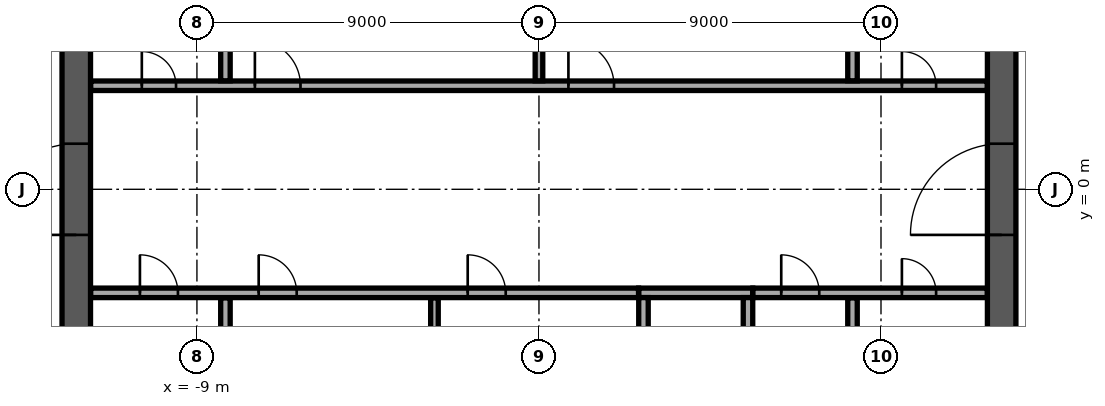
"""IFC4 building model, lengths in metres.
Left out: names, types, materials, properties, quantities, classifications, styles, units other than length and angle.
Written with IfcOpenShell. Run it as: python <this file> out.ifc"""

import sys

from ifc_helpers import new_model, si_unit, direction, frame, frame_2d, origin, place, context, subcontext, project, spatial, rectangle, extrude, element, fill, save


model = new_model("IFC4")
c1 = context("Model", 3, precision=1e-05, world=origin(), true_north=direction((0.0, 1.0)))
c2 = subcontext(c1, "Body", "Model", "MODEL_VIEW")
j1 = project(units=[si_unit("LENGTHUNIT", "METRE"), si_unit("PLANEANGLEUNIT", "RADIAN")], contexts=[c1])
p1 = place(None, origin())
s1 = spatial("IfcSite", under=j1, at=p1, CompositionType="ELEMENT")
p2 = place(p1, origin())
s2 = spatial("IfcBuilding", under=s1, at=p2, CompositionType="ELEMENT")
p3 = place(p2, frame((0.0, 0.0, 254.9)))
s3 = spatial("IfcBuildingStorey", under=s2, at=p3, CompositionType="ELEMENT", Elevation=254.9)
p4 = place(p3, frame((12.175, -11.8, 0.0), z_axis=(0.0, 0.0, 1.0), x_axis=(0.0, 1.0, 0.0)))
e1 = element("IfcWall", 1, at=p4, inside=s3, PredefinedType="SHEAR", context=c2, shape_type="SweptSolid", body=[
    extrude(rectangle(XDim=23.6, YDim=0.75, at=frame_2d((11.8, 0.0))), origin(), (0.0, 0.0, 1.0), 3.64),
])
p5 = place(p4, frame((10.6, 0.0, 0.0)))
e2 = element("IfcOpeningElement", 2, at=p5, cuts=e1, PredefinedType="OPENING", context=c2, shape_type="SweptSolid", body=[
    extrude(rectangle(XDim=2.4, YDim=2.4, at=frame_2d((1.2, 1.2))), frame((0.0, 0.385, 0.0), z_axis=(0.0, -1.0, 0.0), x_axis=(1.0, 0.0, 0.0)), (0.0, 0.0, 1.0), 0.77),
])
p6 = place(p3, frame((-12.175, -11.8, 0.0), z_axis=(0.0, 0.0, 1.0), x_axis=(0.0, 1.0, 0.0)))
e3 = element("IfcWall", 3, at=p6, inside=s3, PredefinedType="SHEAR", context=c2, shape_type="SweptSolid", body=[
    extrude(rectangle(XDim=23.6, YDim=0.75, at=frame_2d((11.8, 0.0))), origin(), (0.0, 0.0, 1.0), 3.64),
])
p7 = place(p6, frame((10.6, 0.0, 0.0)))
e4 = element("IfcOpeningElement", 4, at=p7, cuts=e3, PredefinedType="OPENING", context=c2, shape_type="SweptSolid", body=[
    extrude(rectangle(XDim=2.4, YDim=2.4, at=frame_2d((1.2, 1.2))), frame((0.0, 0.385, 0.0), z_axis=(0.0, -1.0, 0.0), x_axis=(1.0, 0.0, 0.0)), (0.0, 0.0, 1.0), 0.77),
])
p8 = place(p3, frame((2.625, -2.725, 0.0), z_axis=(0.0, 0.0, 1.0), x_axis=(1.0, 0.0, 0.0)))
e5 = element("IfcWall", 5, at=p8, inside=s3, PredefinedType="SOLIDWALL", context=c2, shape_type="SweptSolid", body=[
    extrude(rectangle(XDim=3.0, YDim=0.25, at=frame_2d((1.5, 0.0))), origin(), (0.0, 0.0, 1.0), 3.64),
])
for number, where, z_axis, x_axis in (
    (6, (2.75, -5.55, 0.0), (0.0, 0.0, 1.0), (0.0, 1.0, 0.0)),
    (7, (5.5, -5.55, 0.0), (0.0, 0.0, 1.0), (0.0, 1.0, 0.0)),
):
    element("IfcWall", number, at=place(p3, frame(where, z_axis=z_axis, x_axis=x_axis)), inside=s3, PredefinedType="SOLIDWALL", context=c2, shape_type="SweptSolid", body=[
        extrude(rectangle(XDim=2.7, YDim=0.25, at=frame_2d((1.35, 0.0))), origin(), (0.0, 0.0, 1.0), 3.64),
    ])
p9 = place(p3, frame((-8.25, -5.545, 0.0), z_axis=(0.0, 0.0, 1.0), x_axis=(0.0, 1.0, 0.0)))
e8 = element("IfcWall", 8, at=p9, inside=s3, PredefinedType="PARTITIONING", context=c2, shape_type="SweptSolid", body=[
    extrude(rectangle(XDim=2.69, YDim=0.25, at=frame_2d((1.345, 0.0))), origin(), (0.0, 0.0, 1.0), 3.64),
])
p10 = place(p3, frame((-2.75, -5.545, 0.0), z_axis=(0.0, 0.0, 1.0), x_axis=(0.0, 1.0, 0.0)))
e9 = element("IfcWall", 9, at=p10, inside=s3, PredefinedType="PARTITIONING", context=c2, shape_type="SweptSolid", body=[
    extrude(rectangle(XDim=2.69, YDim=0.2, at=frame_2d((1.345, 0.0))), origin(), (0.0, 0.0, 1.0), 3.64),
])
p11 = place(p3, frame((8.25, -5.545, 0.0), z_axis=(0.0, 0.0, 1.0), x_axis=(0.0, 1.0, 0.0)))
e10 = element("IfcWall", 10, at=p11, inside=s3, PredefinedType="PARTITIONING", context=c2, shape_type="SweptSolid", body=[
    extrude(rectangle(XDim=2.69, YDim=0.25, at=frame_2d((1.345, 0.0))), origin(), (0.0, 0.0, 1.0), 3.64),
])
p12 = place(p3, frame((-11.795, -2.725, 0.0), z_axis=(0.0, 0.0, 1.0), x_axis=(1.0, 0.0, 0.0)))
e11 = element("IfcWall", 11, at=p12, inside=s3, PredefinedType="PARTITIONING", context=c2, shape_type="SweptSolid", body=[
    extrude(rectangle(XDim=14.415, YDim=0.25, at=frame_2d((7.208, 0.0))), origin(), (0.0, 0.0, 1.0), 3.64),
])
p13 = place(p12, frame((1.295, 0.0, 0.0)))
e12 = element("IfcOpeningElement", 12, at=p13, cuts=e11, PredefinedType="OPENING", context=c2, shape_type="SweptSolid", body=[
    extrude(rectangle(XDim=1.0, YDim=2.1, at=frame_2d((0.5, 1.05))), frame((0.0, 0.135, 0.0), z_axis=(0.0, -1.0, 0.0), x_axis=(1.0, 0.0, 0.0)), (0.0, 0.0, 1.0), 0.27),
])
p14 = place(p12, frame((4.42, 0.0, 0.0)))
e13 = element("IfcOpeningElement", 13, at=p14, cuts=e11, PredefinedType="OPENING", context=c2, shape_type="SweptSolid", body=[
    extrude(rectangle(XDim=1.0, YDim=2.1, at=frame_2d((0.5, 1.05))), frame((0.0, 0.135, 0.0), z_axis=(0.0, -1.0, 0.0), x_axis=(1.0, 0.0, 0.0)), (0.0, 0.0, 1.0), 0.27),
])
p15 = place(p12, frame((9.92, 0.0, 0.0)))
e14 = element("IfcOpeningElement", 14, at=p15, cuts=e11, PredefinedType="OPENING", context=c2, shape_type="SweptSolid", body=[
    extrude(rectangle(XDim=1.0, YDim=2.1, at=frame_2d((0.5, 1.05))), frame((0.0, 0.135, 0.0), z_axis=(0.0, -1.0, 0.0), x_axis=(1.0, 0.0, 0.0)), (0.0, 0.0, 1.0), 0.27),
])
p16 = place(p3, frame((5.63, -2.725, 0.0), z_axis=(0.0, 0.0, 1.0), x_axis=(1.0, 0.0, 0.0)))
e15 = element("IfcWall", 15, at=p16, inside=s3, PredefinedType="PARTITIONING", context=c2, shape_type="SweptSolid", body=[
    extrude(rectangle(XDim=6.165, YDim=0.25, at=frame_2d((3.083, 0.0))), origin(), (0.0, 0.0, 1.0), 3.64),
])
p17 = place(p16, frame((0.745, 0.0, 0.0)))
e16 = element("IfcOpeningElement", 16, at=p17, cuts=e15, PredefinedType="OPENING", context=c2, shape_type="SweptSolid", body=[
    extrude(rectangle(XDim=1.0, YDim=2.1, at=frame_2d((0.5, 1.05))), frame((0.0, 0.135, 0.0), z_axis=(0.0, -1.0, 0.0), x_axis=(1.0, 0.0, 0.0)), (0.0, 0.0, 1.0), 0.27),
])
p18 = place(p16, frame((3.92, 0.0, 0.0)))
e17 = element("IfcOpeningElement", 17, at=p18, cuts=e15, PredefinedType="OPENING", context=c2, shape_type="SweptSolid", body=[
    extrude(rectangle(XDim=0.9, YDim=2.1, at=frame_2d((0.45, 1.05))), frame((0.0, 0.135, 0.0), z_axis=(0.0, -1.0, 0.0), x_axis=(1.0, 0.0, 0.0)), (0.0, 0.0, 1.0), 0.27),
])
p19 = place(p3, frame((-11.795, 2.725, 0.0), z_axis=(0.0, 0.0, 1.0), x_axis=(1.0, 0.0, 0.0)))
e18 = element("IfcWall", 18, at=p19, inside=s3, PredefinedType="PARTITIONING", context=c2, shape_type="SweptSolid", body=[
    extrude(rectangle(XDim=23.59, YDim=0.25, at=frame_2d((11.795, 0.0))), origin(), (0.0, 0.0, 1.0), 3.64),
])
p20 = place(p19, frame((21.345, 0.0, 0.0)))
e19 = element("IfcOpeningElement", 19, at=p20, cuts=e18, PredefinedType="OPENING", context=c2, shape_type="SweptSolid", body=[
    extrude(rectangle(XDim=0.9, YDim=2.1, at=frame_2d((0.45, 1.05))), frame((0.0, 0.135, 0.0), z_axis=(0.0, -1.0, 0.0), x_axis=(1.0, 0.0, 0.0)), (0.0, 0.0, 1.0), 0.27),
])
p21 = place(p19, frame((1.345, 0.0, 0.0)))
e20 = element("IfcOpeningElement", 20, at=p21, cuts=e18, PredefinedType="OPENING", context=c2, shape_type="SweptSolid", body=[
    extrude(rectangle(XDim=0.9, YDim=2.1, at=frame_2d((0.45, 1.05))), frame((0.0, 0.135, 0.0), z_axis=(0.0, -1.0, 0.0), x_axis=(1.0, 0.0, 0.0)), (0.0, 0.0, 1.0), 0.27),
])
p22 = place(p19, frame((4.32, 0.0, 0.0)))
e21 = element("IfcOpeningElement", 21, at=p22, cuts=e18, PredefinedType="OPENING", context=c2, shape_type="SweptSolid", body=[
    extrude(rectangle(XDim=1.2, YDim=2.1, at=frame_2d((0.6, 1.05))), frame((0.0, 0.135, 0.0), z_axis=(0.0, -1.0, 0.0), x_axis=(1.0, 0.0, 0.0)), (0.0, 0.0, 1.0), 0.27),
])
p23 = place(p19, frame((12.57, 0.0, 0.0)))
e22 = element("IfcOpeningElement", 22, at=p23, cuts=e18, PredefinedType="OPENING", context=c2, shape_type="SweptSolid", body=[
    extrude(rectangle(XDim=1.2, YDim=2.1, at=frame_2d((0.6, 1.05))), frame((0.0, 0.135, 0.0), z_axis=(0.0, -1.0, 0.0), x_axis=(1.0, 0.0, 0.0)), (0.0, 0.0, 1.0), 0.27),
])
p24 = place(p3, frame((-8.25, 2.855, 0.0), z_axis=(0.0, 0.0, 1.0), x_axis=(0.0, 1.0, 0.0)))
e23 = element("IfcWall", 23, at=p24, inside=s3, PredefinedType="PARTITIONING", context=c2, shape_type="SweptSolid", body=[
    extrude(rectangle(XDim=1.715, YDim=0.25, at=frame_2d((0.857, 0.0))), origin(), (0.0, 0.0, 1.0), 3.64),
])
p25 = place(p3, frame((0.0, 2.855, 0.0), z_axis=(0.0, 0.0, 1.0), x_axis=(0.0, 1.0, 0.0)))
e24 = element("IfcWall", 24, at=p25, inside=s3, PredefinedType="PARTITIONING", context=c2, shape_type="SweptSolid", body=[
    extrude(rectangle(XDim=2.69, YDim=0.2, at=frame_2d((1.345, 0.0))), origin(), (0.0, 0.0, 1.0), 3.64),
])
p26 = place(p3, frame((8.25, 2.855, 0.0), z_axis=(0.0, 0.0, 1.0), x_axis=(0.0, 1.0, 0.0)))
e25 = element("IfcWall", 25, at=p26, inside=s3, PredefinedType="PARTITIONING", context=c2, shape_type="SweptSolid", body=[
    extrude(rectangle(XDim=2.69, YDim=0.25, at=frame_2d((1.345, 0.0))), origin(), (0.0, 0.0, 1.0), 3.64),
])
p27 = place(p3, frame((-6.281, 33.292, 0.0), z_axis=(0.0, 0.0, 1.0), x_axis=(-0.544637268583, -0.838671715077, 0.0)))
e26 = element("IfcWall", 26, at=p27, inside=s3, PredefinedType="STANDARD", context=c2, shape_type="SweptSolid", body=[
    extrude(rectangle(XDim=48.843, YDim=0.6, at=frame_2d((24.422, 0.0))), origin(), (0.0, 0.0, 1.0), 3.64),
])
p28 = place(p27, frame((1.22, 0.0, 0.9)))
e27 = element("IfcOpeningElement", 27, at=p28, cuts=e26, PredefinedType="OPENING", context=c2, shape_type="SweptSolid", body=[
    extrude(rectangle(XDim=2.0, YDim=2.1, at=frame_2d((1.0, 1.05))), frame((0.0, 0.31, 0.0), z_axis=(0.0, -1.0, 0.0), x_axis=(1.0, 0.0, 0.0)), (0.0, 0.0, 1.0), 0.62),
])
p29 = place(p27, frame((5.66, 0.0, 0.9)))
e28 = element("IfcOpeningElement", 28, at=p29, cuts=e26, PredefinedType="OPENING", context=c2, shape_type="SweptSolid", body=[
    extrude(rectangle(XDim=2.0, YDim=2.1, at=frame_2d((1.0, 1.05))), frame((0.0, 0.31, 0.0), z_axis=(0.0, -1.0, 0.0), x_axis=(1.0, 0.0, 0.0)), (0.0, 0.0, 1.0), 0.62),
])
p30 = place(p27, frame((14.541, 0.0, 0.9)))
e29 = element("IfcOpeningElement", 29, at=p30, cuts=e26, PredefinedType="OPENING", context=c2, shape_type="SweptSolid", body=[
    extrude(rectangle(XDim=2.0, YDim=2.1, at=frame_2d((1.0, 1.05))), frame((0.0, 0.31, 0.0), z_axis=(0.0, -1.0, 0.0), x_axis=(1.0, 0.0, 0.0)), (0.0, 0.0, 1.0), 0.62),
])
p31 = place(p27, frame((18.981, 0.0, 0.9)))
e30 = element("IfcOpeningElement", 30, at=p31, cuts=e26, PredefinedType="OPENING", context=c2, shape_type="SweptSolid", body=[
    extrude(rectangle(XDim=2.0, YDim=2.1, at=frame_2d((1.0, 1.05))), frame((0.0, 0.31, 0.0), z_axis=(0.0, -1.0, 0.0), x_axis=(1.0, 0.0, 0.0)), (0.0, 0.0, 1.0), 0.62),
])
p32 = place(p27, frame((23.422, 0.0, 0.9)))
e31 = element("IfcOpeningElement", 31, at=p32, cuts=e26, PredefinedType="OPENING", context=c2, shape_type="SweptSolid", body=[
    extrude(rectangle(XDim=2.0, YDim=2.1, at=frame_2d((1.0, 1.05))), frame((0.0, 0.31, 0.0), z_axis=(0.0, -1.0, 0.0), x_axis=(1.0, 0.0, 0.0)), (0.0, 0.0, 1.0), 0.62),
])
p33 = place(p27, frame((27.862, 0.0, 0.9)))
e32 = element("IfcOpeningElement", 32, at=p33, cuts=e26, PredefinedType="OPENING", context=c2, shape_type="SweptSolid", body=[
    extrude(rectangle(XDim=2.0, YDim=2.1, at=frame_2d((1.0, 1.05))), frame((0.0, 0.31, 0.0), z_axis=(0.0, -1.0, 0.0), x_axis=(1.0, 0.0, 0.0)), (0.0, 0.0, 1.0), 0.62),
])
p34 = place(p27, frame((32.302, 0.0, 0.9)))
e33 = element("IfcOpeningElement", 33, at=p34, cuts=e26, PredefinedType="OPENING", context=c2, shape_type="SweptSolid", body=[
    extrude(rectangle(XDim=2.0, YDim=2.1, at=frame_2d((1.0, 1.05))), frame((0.0, 0.31, 0.0), z_axis=(0.0, -1.0, 0.0), x_axis=(1.0, 0.0, 0.0)), (0.0, 0.0, 1.0), 0.62),
])
p35 = place(p27, frame((36.742, 0.0, 0.9)))
e34 = element("IfcOpeningElement", 34, at=p35, cuts=e26, PredefinedType="OPENING", context=c2, shape_type="SweptSolid", body=[
    extrude(rectangle(XDim=2.0, YDim=2.1, at=frame_2d((1.0, 1.05))), frame((0.0, 0.31, 0.0), z_axis=(0.0, -1.0, 0.0), x_axis=(1.0, 0.0, 0.0)), (0.0, 0.0, 1.0), 0.62),
])
p36 = place(p27, frame((41.183, 0.0, 0.9)))
e35 = element("IfcOpeningElement", 35, at=p36, cuts=e26, PredefinedType="OPENING", context=c2, shape_type="SweptSolid", body=[
    extrude(rectangle(XDim=2.0, YDim=2.1, at=frame_2d((1.0, 1.05))), frame((0.0, 0.31, 0.0), z_axis=(0.0, -1.0, 0.0), x_axis=(1.0, 0.0, 0.0)), (0.0, 0.0, 1.0), 0.62),
])
p37 = place(p27, frame((45.623, 0.0, 0.9)))
e36 = element("IfcOpeningElement", 36, at=p37, cuts=e26, PredefinedType="OPENING", context=c2, shape_type="SweptSolid", body=[
    extrude(rectangle(XDim=2.0, YDim=2.1, at=frame_2d((1.0, 1.05))), frame((0.0, 0.31, 0.0), z_axis=(0.0, -1.0, 0.0), x_axis=(1.0, 0.0, 0.0)), (0.0, 0.0, 1.0), 0.62),
])
p38 = place(p3, frame((6.367, -33.16, 0.0), z_axis=(0.0, 0.0, 1.0), x_axis=(0.544637371147, 0.838671648472, 0.0)))
e37 = element("IfcWall", 37, at=p38, inside=s3, PredefinedType="STANDARD", context=c2, shape_type="SweptSolid", body=[
    extrude(rectangle(XDim=48.686, YDim=0.6, at=frame_2d((24.343, 0.0))), origin(), (0.0, 0.0, 1.0), 3.64),
])
p39 = place(p38, frame((1.213, 0.0, 0.9)))
e38 = element("IfcOpeningElement", 38, at=p39, cuts=e37, PredefinedType="OPENING", context=c2, shape_type="SweptSolid", body=[
    extrude(rectangle(XDim=2.0, YDim=2.1, at=frame_2d((1.0, 1.05))), frame((0.0, 0.31, 0.0), z_axis=(0.0, -1.0, 0.0), x_axis=(1.0, 0.0, 0.0)), (0.0, 0.0, 1.0), 0.62),
])
p40 = place(p38, frame((5.639, 0.0, 0.9)))
e39 = element("IfcOpeningElement", 39, at=p40, cuts=e37, PredefinedType="OPENING", context=c2, shape_type="SweptSolid", body=[
    extrude(rectangle(XDim=2.0, YDim=2.1, at=frame_2d((1.0, 1.05))), frame((0.0, 0.31, 0.0), z_axis=(0.0, -1.0, 0.0), x_axis=(1.0, 0.0, 0.0)), (0.0, 0.0, 1.0), 0.62),
])
p41 = place(p38, frame((14.491, 0.0, 0.9)))
e40 = element("IfcOpeningElement", 40, at=p41, cuts=e37, PredefinedType="OPENING", context=c2, shape_type="SweptSolid", body=[
    extrude(rectangle(XDim=2.0, YDim=2.1, at=frame_2d((1.0, 1.05))), frame((0.0, 0.31, 0.0), z_axis=(0.0, -1.0, 0.0), x_axis=(1.0, 0.0, 0.0)), (0.0, 0.0, 1.0), 0.62),
])
p42 = place(p38, frame((18.917, 0.0, 0.9)))
e41 = element("IfcOpeningElement", 41, at=p42, cuts=e37, PredefinedType="OPENING", context=c2, shape_type="SweptSolid", body=[
    extrude(rectangle(XDim=2.0, YDim=2.1, at=frame_2d((1.0, 1.05))), frame((0.0, 0.31, 0.0), z_axis=(0.0, -1.0, 0.0), x_axis=(1.0, 0.0, 0.0)), (0.0, 0.0, 1.0), 0.62),
])
p43 = place(p38, frame((23.343, 0.0, 0.9)))
e42 = element("IfcOpeningElement", 42, at=p43, cuts=e37, PredefinedType="OPENING", context=c2, shape_type="SweptSolid", body=[
    extrude(rectangle(XDim=2.0, YDim=2.1, at=frame_2d((1.0, 1.05))), frame((0.0, 0.31, 0.0), z_axis=(0.0, -1.0, 0.0), x_axis=(1.0, 0.0, 0.0)), (0.0, 0.0, 1.0), 0.62),
])
p44 = place(p38, frame((27.769, 0.0, 0.9)))
e43 = element("IfcOpeningElement", 43, at=p44, cuts=e37, PredefinedType="OPENING", context=c2, shape_type="SweptSolid", body=[
    extrude(rectangle(XDim=2.0, YDim=2.1, at=frame_2d((1.0, 1.05))), frame((0.0, 0.31, 0.0), z_axis=(0.0, -1.0, 0.0), x_axis=(1.0, 0.0, 0.0)), (0.0, 0.0, 1.0), 0.62),
])
p45 = place(p38, frame((32.195, 0.0, 0.9)))
e44 = element("IfcOpeningElement", 44, at=p45, cuts=e37, PredefinedType="OPENING", context=c2, shape_type="SweptSolid", body=[
    extrude(rectangle(XDim=2.0, YDim=2.1, at=frame_2d((1.0, 1.05))), frame((0.0, 0.31, 0.0), z_axis=(0.0, -1.0, 0.0), x_axis=(1.0, 0.0, 0.0)), (0.0, 0.0, 1.0), 0.62),
])
p46 = place(p38, frame((36.621, 0.0, 0.9)))
e45 = element("IfcOpeningElement", 45, at=p46, cuts=e37, PredefinedType="OPENING", context=c2, shape_type="SweptSolid", body=[
    extrude(rectangle(XDim=2.0, YDim=2.1, at=frame_2d((1.0, 1.05))), frame((0.0, 0.31, 0.0), z_axis=(0.0, -1.0, 0.0), x_axis=(1.0, 0.0, 0.0)), (0.0, 0.0, 1.0), 0.62),
])
p47 = place(p38, frame((41.047, 0.0, 0.9)))
e46 = element("IfcOpeningElement", 46, at=p47, cuts=e37, PredefinedType="OPENING", context=c2, shape_type="SweptSolid", body=[
    extrude(rectangle(XDim=2.0, YDim=2.1, at=frame_2d((1.0, 1.05))), frame((0.0, 0.31, 0.0), z_axis=(0.0, -1.0, 0.0), x_axis=(1.0, 0.0, 0.0)), (0.0, 0.0, 1.0), 0.62),
])
p48 = place(p38, frame((45.473, 0.0, 0.9)))
e47 = element("IfcOpeningElement", 47, at=p48, cuts=e37, PredefinedType="OPENING", context=c2, shape_type="SweptSolid", body=[
    extrude(rectangle(XDim=2.0, YDim=2.1, at=frame_2d((1.0, 1.05))), frame((0.0, 0.31, 0.0), z_axis=(0.0, -1.0, 0.0), x_axis=(1.0, 0.0, 0.0)), (0.0, 0.0, 1.0), 0.62),
])
p49 = place(p5, origin())
e48 = element("IfcDoor", 48, at=p49, inside=s3, OperationType="SINGLE_SWING_LEFT", PredefinedType="DOOR", context=c2, shape_type="SweptSolid", body=[
    extrude(rectangle(XDim=2.4, YDim=2.4, at=frame_2d((1.2, 1.2))), frame((0.0, 0.025, 0.0), z_axis=(0.0, -1.0, 0.0), x_axis=(1.0, 0.0, 0.0)), (0.0, 0.0, 1.0), 0.05),
])
fill(e2, e48)
p50 = place(p7, origin())
e49 = element("IfcDoor", 49, at=p50, inside=s3, OperationType="SINGLE_SWING_LEFT", PredefinedType="DOOR", context=c2, shape_type="SweptSolid", body=[
    extrude(rectangle(XDim=2.4, YDim=2.4, at=frame_2d((1.2, 1.2))), frame((0.0, 0.025, 0.0), z_axis=(0.0, -1.0, 0.0), x_axis=(1.0, 0.0, 0.0)), (0.0, 0.0, 1.0), 0.05),
])
fill(e4, e49)
p51 = place(p13, origin())
e50 = element("IfcDoor", 50, at=p51, inside=s3, OperationType="SINGLE_SWING_LEFT", PredefinedType="DOOR", context=c2, shape_type="SweptSolid", body=[
    extrude(rectangle(XDim=1.0, YDim=2.1, at=frame_2d((0.5, 1.05))), frame((0.0, 0.025, 0.0), z_axis=(0.0, -1.0, 0.0), x_axis=(1.0, 0.0, 0.0)), (0.0, 0.0, 1.0), 0.05),
])
fill(e12, e50)
p52 = place(p17, origin())
e51 = element("IfcDoor", 51, at=p52, inside=s3, OperationType="SINGLE_SWING_LEFT", PredefinedType="DOOR", context=c2, shape_type="SweptSolid", body=[
    extrude(rectangle(XDim=1.0, YDim=2.1, at=frame_2d((0.5, 1.05))), frame((0.0, 0.025, 0.0), z_axis=(0.0, -1.0, 0.0), x_axis=(1.0, 0.0, 0.0)), (0.0, 0.0, 1.0), 0.05),
])
fill(e16, e51)
p53 = place(p20, origin())
e52 = element("IfcDoor", 52, at=p53, inside=s3, OperationType="SINGLE_SWING_LEFT", PredefinedType="DOOR", context=c2, shape_type="SweptSolid", body=[
    extrude(rectangle(XDim=0.9, YDim=2.1, at=frame_2d((0.45, 1.05))), frame((0.0, 0.025, 0.0), z_axis=(0.0, -1.0, 0.0), x_axis=(1.0, 0.0, 0.0)), (0.0, 0.0, 1.0), 0.05),
])
fill(e19, e52)
p54 = place(p18, origin())
e53 = element("IfcDoor", 53, at=p54, inside=s3, OperationType="SINGLE_SWING_LEFT", PredefinedType="DOOR", context=c2, shape_type="SweptSolid", body=[
    extrude(rectangle(XDim=0.9, YDim=2.1, at=frame_2d((0.45, 1.05))), frame((0.0, 0.025, 0.0), z_axis=(0.0, -1.0, 0.0), x_axis=(1.0, 0.0, 0.0)), (0.0, 0.0, 1.0), 0.05),
])
fill(e17, e53)
p55 = place(p21, origin())
e54 = element("IfcDoor", 54, at=p55, inside=s3, OperationType="SINGLE_SWING_LEFT", PredefinedType="DOOR", context=c2, shape_type="SweptSolid", body=[
    extrude(rectangle(XDim=0.9, YDim=2.1, at=frame_2d((0.45, 1.05))), frame((0.0, 0.025, 0.0), z_axis=(0.0, -1.0, 0.0), x_axis=(1.0, 0.0, 0.0)), (0.0, 0.0, 1.0), 0.05),
])
fill(e20, e54)
p56 = place(p22, origin())
e55 = element("IfcDoor", 55, at=p56, inside=s3, OperationType="SINGLE_SWING_LEFT", PredefinedType="DOOR", context=c2, shape_type="SweptSolid", body=[
    extrude(rectangle(XDim=1.2, YDim=2.1, at=frame_2d((0.6, 1.05))), frame((0.0, 0.025, 0.0), z_axis=(0.0, -1.0, 0.0), x_axis=(1.0, 0.0, 0.0)), (0.0, 0.0, 1.0), 0.05),
])
fill(e21, e55)
p57 = place(p23, origin())
e56 = element("IfcDoor", 56, at=p57, inside=s3, OperationType="SINGLE_SWING_LEFT", PredefinedType="DOOR", context=c2, shape_type="SweptSolid", body=[
    extrude(rectangle(XDim=1.2, YDim=2.1, at=frame_2d((0.6, 1.05))), frame((0.0, 0.025, 0.0), z_axis=(0.0, -1.0, 0.0), x_axis=(1.0, 0.0, 0.0)), (0.0, 0.0, 1.0), 0.05),
])
fill(e22, e56)
p58 = place(p14, origin())
e57 = element("IfcDoor", 57, at=p58, inside=s3, OperationType="SINGLE_SWING_LEFT", PredefinedType="DOOR", context=c2, shape_type="SweptSolid", body=[
    extrude(rectangle(XDim=1.0, YDim=2.1, at=frame_2d((0.5, 1.05))), frame((0.0, 0.025, 0.0), z_axis=(0.0, -1.0, 0.0), x_axis=(1.0, 0.0, 0.0)), (0.0, 0.0, 1.0), 0.05),
])
fill(e13, e57)
p59 = place(p15, origin())
e58 = element("IfcDoor", 58, at=p59, inside=s3, OperationType="SINGLE_SWING_LEFT", PredefinedType="DOOR", context=c2, shape_type="SweptSolid", body=[
    extrude(rectangle(XDim=1.0, YDim=2.1, at=frame_2d((0.5, 1.05))), frame((0.0, 0.025, 0.0), z_axis=(0.0, -1.0, 0.0), x_axis=(1.0, 0.0, 0.0)), (0.0, 0.0, 1.0), 0.05),
])
fill(e14, e58)
save(model, sys.argv[1])
